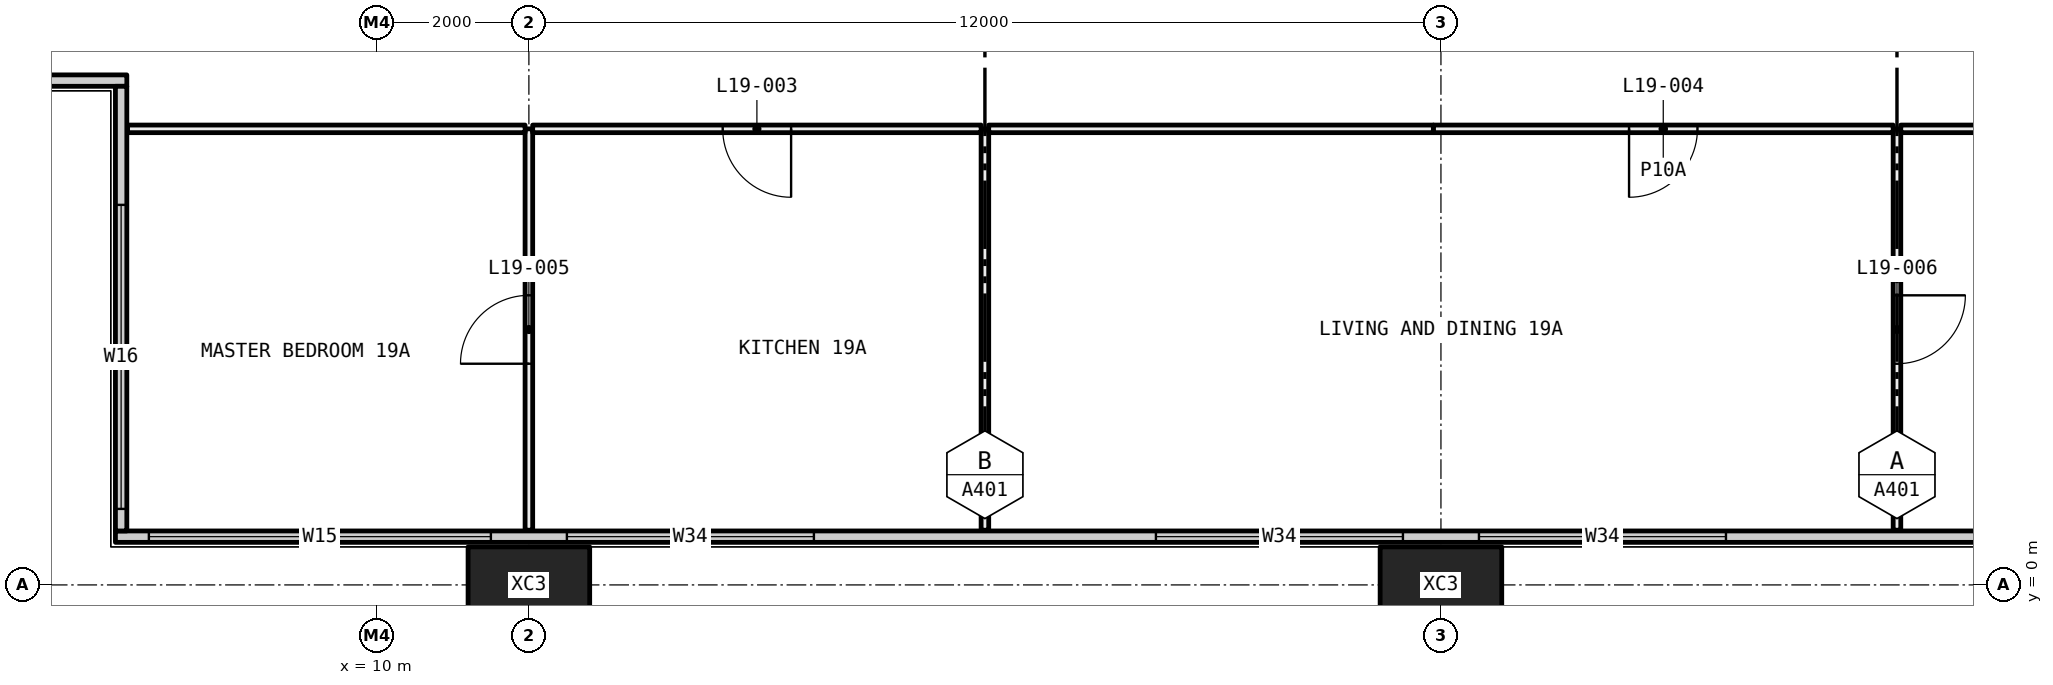
"""IFC4 building model, lengths in metres.
Left out: names, types, materials, properties, quantities, classifications, styles, units other than length and angle.
Written with IfcOpenShell. Run it as: python <this file> out.ifc"""

import sys

from ifc_helpers import new_model, si_unit, direction, frame, frame_2d, origin, origin_2d, place, context, subcontext, project, spatial, rectangle, hollow_rectangle, extrude, element, fill, save


model = new_model("IFC4")
c1 = context("Model", 3, precision=1e-05, world=origin(), true_north=direction((0.0, 1.0)))
c2 = subcontext(c1, "Body", "Model", "MODEL_VIEW")
j1 = project(units=[si_unit("LENGTHUNIT", "METRE"), si_unit("PLANEANGLEUNIT", "RADIAN")], contexts=[c1])
p1 = place(None, origin())
s1 = spatial("IfcSite", under=j1, at=p1, CompositionType="ELEMENT")
p2 = place(p1, origin())
s2 = spatial("IfcBuilding", under=s1, at=p2, CompositionType="ELEMENT")
p3 = place(p2, frame((0.0, 0.0, 78.3)))
s3 = spatial("IfcBuildingStorey", under=s2, at=p3, CompositionType="ELEMENT", Elevation=78.3)
for number, where, z_axis, x_axis in (
    (1, (12.0, 0.0, -0.4), (0.0, 0.0, 1.0), (1.0, 0.0, 0.0)),
    (2, (24.0, 0.0, -0.4), (0.0, 0.0, 1.0), (1.0, 0.0, 0.0)),
):
    element("IfcColumn", number, at=place(p3, frame(where, z_axis=z_axis, x_axis=x_axis)), inside=s3, PredefinedType="COLUMN", context=c2, shape_type="SweptSolid", body=[
        extrude(hollow_rectangle(XDim=1.6, YDim=1.0, WallThickness=0.065, at=origin_2d()), origin(), (0.0, 0.0, 1.0), 3.45),
    ])
p4 = place(p3, frame((6.56, 0.635, 0.0), z_axis=(0.0, 0.0, 1.0), x_axis=(1.0, 0.0, 0.0)))
e3 = element("IfcWall", 3, at=p4, inside=s3, PredefinedType="ELEMENTEDWALL", context=c2, shape_type="SweptSolid", body=[
    extrude(rectangle(XDim=58.88, YDim=0.15, at=frame_2d((29.44, 0.0))), origin(), (0.0, 0.0, 1.0), 3.05),
])
p5 = place(p4, frame((0.44, 0.0, 0.45)))
e4 = element("IfcOpeningElement", 4, at=p5, cuts=e3, PredefinedType="OPENING", context=c2, shape_type="SweptSolid", body=[
    extrude(rectangle(XDim=4.5, YDim=2.55, at=frame_2d((2.25, 1.275))), frame((0.0, 0.085, 0.0), z_axis=(0.0, -1.0, 0.0), x_axis=(1.0, 0.0, 0.0)), (0.0, 0.0, 1.0), 0.17),
])
p6 = place(p4, frame((5.94, 0.0, 0.45)))
e5 = element("IfcOpeningElement", 5, at=p6, cuts=e3, PredefinedType="OPENING", context=c2, shape_type="SweptSolid", body=[
    extrude(rectangle(XDim=3.25, YDim=2.55, at=frame_2d((1.625, 1.275))), frame((0.0, 0.085, 0.0), z_axis=(0.0, -1.0, 0.0), x_axis=(1.0, 0.0, 0.0)), (0.0, 0.0, 1.0), 0.17),
])
p7 = place(p4, frame((13.69, 0.0, 0.45)))
e6 = element("IfcOpeningElement", 6, at=p7, cuts=e3, PredefinedType="OPENING", context=c2, shape_type="SweptSolid", body=[
    extrude(rectangle(XDim=3.25, YDim=2.55, at=frame_2d((1.625, 1.275))), frame((0.0, 0.085, 0.0), z_axis=(0.0, -1.0, 0.0), x_axis=(1.0, 0.0, 0.0)), (0.0, 0.0, 1.0), 0.17),
])
p8 = place(p4, frame((17.94, 0.0, 0.45)))
e7 = element("IfcOpeningElement", 7, at=p8, cuts=e3, PredefinedType="OPENING", context=c2, shape_type="SweptSolid", body=[
    extrude(rectangle(XDim=3.25, YDim=2.55, at=frame_2d((1.625, 1.275))), frame((0.0, 0.085, 0.0), z_axis=(0.0, -1.0, 0.0), x_axis=(1.0, 0.0, 0.0)), (0.0, 0.0, 1.0), 0.17),
])
p9 = place(p4, frame((26.94, 0.0, 0.45)))
e8 = element("IfcOpeningElement", 8, at=p9, cuts=e3, PredefinedType="OPENING", context=c2, shape_type="SweptSolid", body=[
    extrude(rectangle(XDim=2.0, YDim=2.55, at=frame_2d((1.0, 1.275))), frame((0.0, 0.085, 0.0), z_axis=(0.0, -1.0, 0.0), x_axis=(1.0, 0.0, 0.0)), (0.0, 0.0, 1.0), 0.17),
])
p10 = place(p4, frame((29.94, 0.0, 0.45)))
e9 = element("IfcOpeningElement", 9, at=p10, cuts=e3, PredefinedType="OPENING", context=c2, shape_type="SweptSolid", body=[
    extrude(rectangle(XDim=3.25, YDim=2.55, at=frame_2d((1.625, 1.275))), frame((0.0, 0.085, 0.0), z_axis=(0.0, -1.0, 0.0), x_axis=(1.0, 0.0, 0.0)), (0.0, 0.0, 1.0), 0.17),
])
p11 = place(p4, frame((37.69, 0.0, 0.45)))
e10 = element("IfcOpeningElement", 10, at=p11, cuts=e3, PredefinedType="OPENING", context=c2, shape_type="SweptSolid", body=[
    extrude(rectangle(XDim=3.25, YDim=2.55, at=frame_2d((1.625, 1.275))), frame((0.0, 0.085, 0.0), z_axis=(0.0, -1.0, 0.0), x_axis=(1.0, 0.0, 0.0)), (0.0, 0.0, 1.0), 0.17),
])
p12 = place(p4, frame((41.94, 0.0, 0.45)))
e11 = element("IfcOpeningElement", 11, at=p12, cuts=e3, PredefinedType="OPENING", context=c2, shape_type="SweptSolid", body=[
    extrude(rectangle(XDim=3.25, YDim=2.55, at=frame_2d((1.625, 1.275))), frame((0.0, 0.085, 0.0), z_axis=(0.0, -1.0, 0.0), x_axis=(1.0, 0.0, 0.0)), (0.0, 0.0, 1.0), 0.17),
])
p13 = place(p4, frame((50.94, 0.0, 0.45)))
e12 = element("IfcOpeningElement", 12, at=p13, cuts=e3, PredefinedType="OPENING", context=c2, shape_type="SweptSolid", body=[
    extrude(rectangle(XDim=2.0, YDim=2.55, at=frame_2d((1.0, 1.275))), frame((0.0, 0.085, 0.0), z_axis=(0.0, -1.0, 0.0), x_axis=(1.0, 0.0, 0.0)), (0.0, 0.0, 1.0), 0.17),
])
p14 = place(p4, frame((53.94, 0.0, 0.45)))
e13 = element("IfcOpeningElement", 13, at=p14, cuts=e3, PredefinedType="OPENING", context=c2, shape_type="SweptSolid", body=[
    extrude(rectangle(XDim=4.5, YDim=2.55, at=frame_2d((2.25, 1.275))), frame((0.0, 0.085, 0.0), z_axis=(0.0, -1.0, 0.0), x_axis=(1.0, 0.0, 0.0)), (0.0, 0.0, 1.0), 0.17),
])
p15 = place(p3, frame((0.56, 6.635, 0.0), z_axis=(0.0, 0.0, 1.0), x_axis=(1.0, 0.0, 0.0)))
e14 = element("IfcWall", 14, at=p15, inside=s3, PredefinedType="ELEMENTEDWALL", context=c2, shape_type="SweptSolid", body=[
    extrude(rectangle(XDim=6.15, YDim=0.15, at=frame_2d((3.075, 0.0))), origin(), (0.0, 0.0, 1.0), 3.05),
])
p16 = place(p15, frame((0.44, 0.0, 0.45)))
e15 = element("IfcOpeningElement", 15, at=p16, cuts=e14, PredefinedType="OPENING", context=c2, shape_type="SweptSolid", body=[
    extrude(rectangle(XDim=4.0, YDim=2.55, at=frame_2d((2.0, 1.275))), frame((0.0, 0.085, 0.0), z_axis=(0.0, -1.0, 0.0), x_axis=(1.0, 0.0, 0.0)), (0.0, 0.0, 1.0), 0.17),
])
p17 = place(p3, frame((6.635, 0.71, 0.0), z_axis=(0.0, 0.0, 1.0), x_axis=(0.0, 1.0, 0.0)))
e16 = element("IfcWall", 16, at=p17, inside=s3, PredefinedType="ELEMENTEDWALL", context=c2, shape_type="SweptSolid", body=[
    extrude(rectangle(XDim=5.85, YDim=0.15, at=frame_2d((2.925, 0.0))), origin(), (0.0, 0.0, 1.0), 3.05),
])
p18 = place(p17, frame((0.29, 0.0, 0.45)))
e17 = element("IfcOpeningElement", 17, at=p18, cuts=e16, PredefinedType="OPENING", context=c2, shape_type="SweptSolid", body=[
    extrude(rectangle(XDim=4.0, YDim=2.55, at=frame_2d((2.0, 1.275))), frame((0.0, 0.085, 0.0), z_axis=(0.0, -1.0, 0.0), x_axis=(1.0, 0.0, 0.0)), (0.0, 0.0, 1.0), 0.17),
])
p19 = place(p3, frame((12.0, 0.72, 0.0), z_axis=(0.0, 0.0, 1.0), x_axis=(0.0, 1.0, 0.0)))
e18 = element("IfcWall", 18, at=p19, inside=s3, PredefinedType="PARTITIONING", context=c2, shape_type="SweptSolid", body=[
    extrude(rectangle(XDim=5.28, YDim=0.1, at=frame_2d((2.64, 0.0))), origin(), (0.0, 0.0, 1.0), 2.45),
])
p20 = place(p19, frame((2.19, 0.0, 0.0)))
e19 = element("IfcOpeningElement", 19, at=p20, cuts=e18, PredefinedType="OPENING", context=c2, shape_type="SweptSolid", body=[
    extrude(rectangle(XDim=0.9, YDim=2.1, at=frame_2d((0.45, 1.05))), frame((0.0, 0.06, 0.0), z_axis=(0.0, -1.0, 0.0), x_axis=(1.0, 0.0, 0.0)), (0.0, 0.0, 1.0), 0.12),
])
p21 = place(p3, frame((11.95, 6.0, 0.0), z_axis=(0.0, 0.0, 1.0), x_axis=(-1.0, 0.0, 0.0)))
e20 = element("IfcWall", 20, at=p21, inside=s3, PredefinedType="PARTITIONING", context=c2, shape_type="SweptSolid", body=[
    extrude(rectangle(XDim=5.23, YDim=0.1, at=frame_2d((2.615, 0.0))), origin(), (0.0, 0.0, 1.0), 2.45),
])
p22 = place(p3, frame((18.0, 0.72, 0.0), z_axis=(0.0, 0.0, 1.0), x_axis=(0.0, 1.0, 0.0)))
e21 = element("IfcWall", 21, at=p22, inside=s3, PredefinedType="PARTITIONING", context=c2, shape_type="SweptSolid", body=[
    extrude(rectangle(XDim=5.28, YDim=0.1, at=frame_2d((2.64, 0.0))), origin(), (0.0, 0.0, 1.0), 3.05),
])
p23 = place(p3, frame((17.95, 6.0, 0.0), z_axis=(0.0, 0.0, 1.0), x_axis=(-1.0, 0.0, 0.0)))
e22 = element("IfcWall", 22, at=p23, inside=s3, PredefinedType="PARTITIONING", context=c2, shape_type="SweptSolid", body=[
    extrude(rectangle(XDim=5.9, YDim=0.1, at=frame_2d((2.95, 0.0))), origin(), (0.0, 0.0, 1.0), 2.45),
])
p24 = place(p23, frame((2.5, 0.0, 0.0)))
e23 = element("IfcOpeningElement", 23, at=p24, cuts=e22, PredefinedType="OPENING", context=c2, shape_type="SweptSolid", body=[
    extrude(rectangle(XDim=0.9, YDim=2.1, at=frame_2d((0.45, 1.05))), frame((0.0, 0.06, 0.0), z_axis=(0.0, -1.0, 0.0), x_axis=(1.0, 0.0, 0.0)), (0.0, 0.0, 1.0), 0.12),
])
p25 = place(p3, frame((30.0, 0.72, 0.0), z_axis=(0.0, 0.0, 1.0), x_axis=(0.0, 1.0, 0.0)))
e24 = element("IfcWall", 24, at=p25, inside=s3, PredefinedType="PARTITIONING", context=c2, shape_type="SweptSolid", body=[
    extrude(rectangle(XDim=5.28, YDim=0.1, at=frame_2d((2.64, 0.0))), origin(), (0.0, 0.0, 1.0), 3.05),
])
p26 = place(p25, frame((2.19, 0.0, 0.0)))
e25 = element("IfcOpeningElement", 25, at=p26, cuts=e24, PredefinedType="OPENING", context=c2, shape_type="SweptSolid", body=[
    extrude(rectangle(XDim=0.9, YDim=2.1, at=frame_2d((0.45, 1.05))), frame((0.0, 0.06, 0.0), z_axis=(0.0, -1.0, 0.0), x_axis=(1.0, 0.0, 0.0)), (0.0, 0.0, 1.0), 0.12),
])
p27 = place(p3, frame((29.95, 6.0, 0.0), z_axis=(0.0, 0.0, 1.0), x_axis=(-1.0, 0.0, 0.0)))
e26 = element("IfcWall", 26, at=p27, inside=s3, PredefinedType="PARTITIONING", context=c2, shape_type="SweptSolid", body=[
    extrude(rectangle(XDim=6.05, YDim=0.1, at=frame_2d((3.025, 0.0))), origin(), (0.0, 0.0, 1.0), 2.45),
])
p28 = place(p27, frame((2.575, 0.0, 0.0)))
e27 = element("IfcOpeningElement", 27, at=p28, cuts=e26, PredefinedType="OPENING", context=c2, shape_type="SweptSolid", body=[
    extrude(rectangle(XDim=0.9, YDim=2.1, at=frame_2d((0.45, 1.05))), frame((0.0, 0.06, 0.0), z_axis=(0.0, -1.0, 0.0), x_axis=(1.0, 0.0, 0.0)), (0.0, 0.0, 1.0), 0.12),
])
p29 = place(p3, frame((23.9, 6.0, 0.0), z_axis=(0.0, 0.0, 1.0), x_axis=(-1.0, 0.0, 0.0)))
e28 = element("IfcWall", 28, at=p29, inside=s3, PredefinedType="PARTITIONING", context=c2, shape_type="SweptSolid", body=[
    extrude(rectangle(XDim=5.85, YDim=0.1, at=frame_2d((2.925, 0.0))), origin(), (0.0, 0.0, 1.0), 3.05),
])
p30 = place(p3, frame((32.925, 6.0, 0.0), z_axis=(0.0, 0.0, 1.0), x_axis=(-1.0, 0.0, 0.0)))
e29 = element("IfcWall", 29, at=p30, inside=s3, PredefinedType="PARTITIONING", context=c2, shape_type="SweptSolid", body=[
    extrude(rectangle(XDim=2.875, YDim=0.1, at=frame_2d((1.438, 0.0))), origin(), (0.0, 0.0, 1.0), 3.05),
])
p31 = place(p5, origin())
e30 = element("IfcWindow", 30, at=p31, inside=s3, PartitioningType="SINGLE_PANEL", PredefinedType="WINDOW", context=c2, shape_type="SweptSolid", body=[
    extrude(rectangle(XDim=4.5, YDim=2.55, at=frame_2d((2.25, 1.275))), frame((0.0, 0.03, 0.0), z_axis=(0.0, -1.0, 0.0), x_axis=(1.0, 0.0, 0.0)), (0.0, 0.0, 1.0), 0.06),
])
fill(e4, e30)
p32 = place(p6, origin())
e31 = element("IfcWindow", 31, at=p32, inside=s3, PartitioningType="SINGLE_PANEL", PredefinedType="WINDOW", context=c2, shape_type="SweptSolid", body=[
    extrude(rectangle(XDim=3.25, YDim=2.55, at=frame_2d((1.625, 1.275))), frame((0.0, 0.03, 0.0), z_axis=(0.0, -1.0, 0.0), x_axis=(1.0, 0.0, 0.0)), (0.0, 0.0, 1.0), 0.06),
])
fill(e5, e31)
p33 = place(p7, origin())
e32 = element("IfcWindow", 32, at=p33, inside=s3, PartitioningType="SINGLE_PANEL", PredefinedType="WINDOW", context=c2, shape_type="SweptSolid", body=[
    extrude(rectangle(XDim=3.25, YDim=2.55, at=frame_2d((1.625, 1.275))), frame((0.0, 0.03, 0.0), z_axis=(0.0, -1.0, 0.0), x_axis=(1.0, 0.0, 0.0)), (0.0, 0.0, 1.0), 0.06),
])
fill(e6, e32)
p34 = place(p8, origin())
e33 = element("IfcWindow", 33, at=p34, inside=s3, PartitioningType="SINGLE_PANEL", PredefinedType="WINDOW", context=c2, shape_type="SweptSolid", body=[
    extrude(rectangle(XDim=3.25, YDim=2.55, at=frame_2d((1.625, 1.275))), frame((0.0, 0.03, 0.0), z_axis=(0.0, -1.0, 0.0), x_axis=(1.0, 0.0, 0.0)), (0.0, 0.0, 1.0), 0.06),
])
fill(e7, e33)
p35 = place(p18, origin())
e34 = element("IfcWindow", 34, at=p35, inside=s3, PartitioningType="SINGLE_PANEL", PredefinedType="WINDOW", context=c2, shape_type="SweptSolid", body=[
    extrude(rectangle(XDim=4.0, YDim=2.55, at=frame_2d((2.0, 1.275))), frame((0.0, 0.03, 0.0), z_axis=(0.0, -1.0, 0.0), x_axis=(1.0, 0.0, 0.0)), (0.0, 0.0, 1.0), 0.06),
])
fill(e17, e34)
p36 = place(p24, origin())
e35 = element("IfcDoor", 35, at=p36, inside=s3, OperationType="SINGLE_SWING_RIGHT", PredefinedType="DOOR", context=c2, shape_type="SweptSolid", body=[
    extrude(rectangle(XDim=0.9, YDim=2.1, at=frame_2d((0.45, 1.05))), frame((0.0, 0.025, 0.0), z_axis=(0.0, -1.0, 0.0), x_axis=(1.0, 0.0, 0.0)), (0.0, 0.0, 1.0), 0.05),
])
fill(e23, e35)
p37 = place(p28, origin())
e36 = element("IfcDoor", 36, at=p37, inside=s3, OperationType="SINGLE_SWING_LEFT", PredefinedType="DOOR", context=c2, shape_type="SweptSolid", body=[
    extrude(rectangle(XDim=0.9, YDim=2.1, at=frame_2d((0.45, 1.05))), frame((0.0, 0.025, 0.0), z_axis=(0.0, -1.0, 0.0), x_axis=(1.0, 0.0, 0.0)), (0.0, 0.0, 1.0), 0.05),
])
fill(e27, e36)
p38 = place(p20, origin())
e37 = element("IfcDoor", 37, at=p38, inside=s3, OperationType="SINGLE_SWING_RIGHT", PredefinedType="DOOR", context=c2, shape_type="SweptSolid", body=[
    extrude(rectangle(XDim=0.9, YDim=2.1, at=frame_2d((0.45, 1.05))), frame((0.0, 0.025, 0.0), z_axis=(0.0, -1.0, 0.0), x_axis=(1.0, 0.0, 0.0)), (0.0, 0.0, 1.0), 0.05),
])
fill(e19, e37)
p39 = place(p26, frame((0.9, 0.0, 0.0), x_axis=(-1.0, 0.0, 0.0)))
e38 = element("IfcDoor", 38, at=p39, inside=s3, OperationType="SINGLE_SWING_RIGHT", PredefinedType="DOOR", context=c2, shape_type="SweptSolid", body=[
    extrude(rectangle(XDim=0.9, YDim=2.1, at=frame_2d((0.45, 1.05))), frame((0.0, 0.025, 0.0), z_axis=(0.0, -1.0, 0.0), x_axis=(1.0, 0.0, 0.0)), (0.0, 0.0, 1.0), 0.05),
])
fill(e25, e38)
save(model, sys.argv[1])
